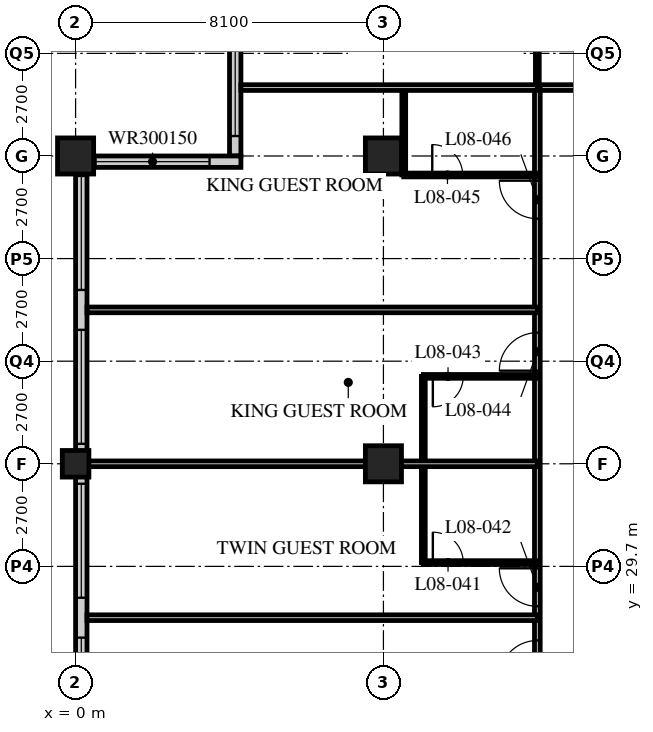
"""IFC4 building model, lengths in metres.
Left out: names, types, materials, properties, quantities, classifications, styles, units other than length and angle.
Written with IfcOpenShell. Run it as: python <this file> out.ifc"""

import sys

from ifc_helpers import new_model, si_unit, direction, frame, frame_2d, origin, origin_2d, place, context, subcontext, project, spatial, rectangle, hollow_rectangle, extrude, element, fill, save


model = new_model("IFC4")
c1 = context("Model", 3, precision=1e-05, world=origin(), true_north=direction((0.0, 1.0)))
c2 = subcontext(c1, "Body", "Model", "MODEL_VIEW")
j1 = project(units=[si_unit("LENGTHUNIT", "METRE"), si_unit("PLANEANGLEUNIT", "RADIAN")], contexts=[c1])
p1 = place(None, origin())
s1 = spatial("IfcSite", under=j1, at=p1, CompositionType="ELEMENT")
p2 = place(p1, origin())
s2 = spatial("IfcBuilding", under=s1, at=p2, CompositionType="ELEMENT")
p3 = place(p2, frame((0.0, 0.0, 39.8)))
s3 = spatial("IfcBuildingStorey", under=s2, at=p3, CompositionType="ELEMENT", Elevation=39.8)
p4 = place(p3, frame((0.0, 32.4, 0.0), z_axis=(0.0, 0.0, 1.0), x_axis=(1.0, 0.0, 0.0)))
e1 = element("IfcColumn", 1, at=p4, inside=s3, PredefinedType="COLUMN", context=c2, shape_type="SweptSolid", body=[
    extrude(hollow_rectangle(XDim=0.7, YDim=0.7, WallThickness=0.06, at=origin_2d()), origin(), (0.0, 0.0, 1.0), 3.4),
])
for number, where, z_axis, x_axis in (
    (2, (0.0, 40.5, 0.0), (0.0, 0.0, 1.0), (1.0, 0.0, 0.0)),
    (3, (8.1, 32.4, 0.0), (0.0, 0.0, 1.0), (1.0, 0.0, 0.0)),
    (4, (8.1, 40.5, 0.0), (0.0, 0.0, 1.0), (1.0, 0.0, 0.0)),
):
    element("IfcColumn", number, at=place(p3, frame(where, z_axis=z_axis, x_axis=x_axis)), inside=s3, PredefinedType="COLUMN", context=c2, shape_type="SweptSolid", body=[
        extrude(hollow_rectangle(XDim=0.95, YDim=0.95, WallThickness=0.095, at=origin_2d()), origin(), (0.0, 0.0, 1.0), 3.4),
    ])
p5 = place(p3, frame((4.2, 44.25, 0.0), z_axis=(0.0, 0.0, 1.0), x_axis=(0.0, -1.0, 0.0)))
e5 = element("IfcWall", 5, at=p5, inside=s3, PredefinedType="SOLIDWALL", context=c2, shape_type="SweptSolid", body=[
    extrude(rectangle(XDim=3.75, YDim=0.3, at=frame_2d((1.875, 0.0))), origin(), (0.0, 0.0, 1.0), 3.19),
])
p6 = place(p5, frame((0.225, 0.0, 0.9)))
e6 = element("IfcOpeningElement", 6, at=p6, cuts=e5, PredefinedType="OPENING", context=c2, shape_type="SweptSolid", body=[
    extrude(rectangle(XDim=3.0, YDim=1.5, at=frame_2d((1.5, 0.75))), frame((0.0, 0.16, 0.0), z_axis=(0.0, -1.0, 0.0), x_axis=(1.0, 0.0, 0.0)), (0.0, 0.0, 1.0), 0.32),
])
p7 = place(p3, frame((4.35, 40.35, 0.0), z_axis=(0.0, 0.0, 1.0), x_axis=(-1.0, 0.0, 0.0)))
e7 = element("IfcWall", 7, at=p7, inside=s3, PredefinedType="SOLIDWALL", context=c2, shape_type="SweptSolid", body=[
    extrude(rectangle(XDim=4.35, YDim=0.3, at=frame_2d((2.175, 0.0))), origin(), (0.0, 0.0, 1.0), 3.19),
])
p8 = place(p7, frame((0.825, 0.0, 0.9)))
e8 = element("IfcOpeningElement", 8, at=p8, cuts=e7, PredefinedType="OPENING", context=c2, shape_type="SweptSolid", body=[
    extrude(rectangle(XDim=3.0, YDim=1.5, at=frame_2d((1.5, 0.75))), frame((0.0, 0.16, 0.0), z_axis=(0.0, -1.0, 0.0), x_axis=(1.0, 0.0, 0.0)), (0.0, 0.0, 1.0), 0.32),
])
p9 = place(p3, frame((0.15, 40.2, 0.0), z_axis=(0.0, 0.0, 1.0), x_axis=(0.0, -1.0, 0.0)))
e9 = element("IfcWall", 9, at=p9, inside=s3, PredefinedType="SOLIDWALL", context=c2, shape_type="SweptSolid", body=[
    extrude(rectangle(XDim=32.1, YDim=0.3, at=frame_2d((16.05, 0.0))), origin(), (0.0, 0.0, 1.0), 3.19),
])
p10 = place(p9, frame((0.225, 0.0, 0.9)))
e10 = element("IfcOpeningElement", 10, at=p10, cuts=e9, PredefinedType="OPENING", context=c2, shape_type="SweptSolid", body=[
    extrude(rectangle(XDim=3.0, YDim=2.0, at=frame_2d((1.5, 1.0))), frame((0.0, 0.16, 0.0), z_axis=(0.0, -1.0, 0.0), x_axis=(1.0, 0.0, 0.0)), (0.0, 0.0, 1.0), 0.32),
])
p11 = place(p9, frame((4.275, 0.0, 0.9)))
e11 = element("IfcOpeningElement", 11, at=p11, cuts=e9, PredefinedType="OPENING", context=c2, shape_type="SweptSolid", body=[
    extrude(rectangle(XDim=3.0, YDim=2.0, at=frame_2d((1.5, 1.0))), frame((0.0, 0.16, 0.0), z_axis=(0.0, -1.0, 0.0), x_axis=(1.0, 0.0, 0.0)), (0.0, 0.0, 1.0), 0.32),
])
p12 = place(p9, frame((8.325, 0.0, 0.9)))
e12 = element("IfcOpeningElement", 12, at=p12, cuts=e9, PredefinedType="OPENING", context=c2, shape_type="SweptSolid", body=[
    extrude(rectangle(XDim=3.0, YDim=2.0, at=frame_2d((1.5, 1.0))), frame((0.0, 0.16, 0.0), z_axis=(0.0, -1.0, 0.0), x_axis=(1.0, 0.0, 0.0)), (0.0, 0.0, 1.0), 0.32),
])
p13 = place(p9, frame((12.375, 0.0, 0.9)))
e13 = element("IfcOpeningElement", 13, at=p13, cuts=e9, PredefinedType="OPENING", context=c2, shape_type="SweptSolid", body=[
    extrude(rectangle(XDim=3.0, YDim=2.0, at=frame_2d((1.5, 1.0))), frame((0.0, 0.16, 0.0), z_axis=(0.0, -1.0, 0.0), x_axis=(1.0, 0.0, 0.0)), (0.0, 0.0, 1.0), 0.32),
])
p14 = place(p9, frame((16.425, 0.0, 0.9)))
e14 = element("IfcOpeningElement", 14, at=p14, cuts=e9, PredefinedType="OPENING", context=c2, shape_type="SweptSolid", body=[
    extrude(rectangle(XDim=3.0, YDim=2.0, at=frame_2d((1.5, 1.0))), frame((0.0, 0.16, 0.0), z_axis=(0.0, -1.0, 0.0), x_axis=(1.0, 0.0, 0.0)), (0.0, 0.0, 1.0), 0.32),
])
p15 = place(p9, frame((20.475, 0.0, 0.9)))
e15 = element("IfcOpeningElement", 15, at=p15, cuts=e9, PredefinedType="OPENING", context=c2, shape_type="SweptSolid", body=[
    extrude(rectangle(XDim=3.0, YDim=2.0, at=frame_2d((1.5, 1.0))), frame((0.0, 0.16, 0.0), z_axis=(0.0, -1.0, 0.0), x_axis=(1.0, 0.0, 0.0)), (0.0, 0.0, 1.0), 0.32),
])
p16 = place(p9, frame((24.525, 0.0, 0.9)))
e16 = element("IfcOpeningElement", 16, at=p16, cuts=e9, PredefinedType="OPENING", context=c2, shape_type="SweptSolid", body=[
    extrude(rectangle(XDim=3.0, YDim=2.0, at=frame_2d((1.5, 1.0))), frame((0.0, 0.16, 0.0), z_axis=(0.0, -1.0, 0.0), x_axis=(1.0, 0.0, 0.0)), (0.0, 0.0, 1.0), 0.32),
])
p17 = place(p9, frame((28.575, 0.0, 0.9)))
e17 = element("IfcOpeningElement", 17, at=p17, cuts=e9, PredefinedType="OPENING", context=c2, shape_type="SweptSolid", body=[
    extrude(rectangle(XDim=3.0, YDim=2.0, at=frame_2d((1.5, 1.0))), frame((0.0, 0.16, 0.0), z_axis=(0.0, -1.0, 0.0), x_axis=(1.0, 0.0, 0.0)), (0.0, 0.0, 1.0), 0.32),
])
p18 = place(p3, frame((12.15, 42.3, 0.0), z_axis=(0.0, 0.0, 1.0), x_axis=(1.0, 0.0, 0.0)))
e18 = element("IfcWall", 18, at=p18, inside=s3, PredefinedType="PARTITIONING", context=c2, shape_type="SweptSolid", body=[
    extrude(rectangle(XDim=32.4, YDim=0.15, at=frame_2d((16.2, 0.0))), origin(), (0.0, 0.0, 1.0), 3.19),
])
p19 = place(p18, frame((6.5, 0.0, 0.0)))
e19 = element("IfcOpeningElement", 19, at=p19, cuts=e18, PredefinedType="OPENING", context=c2, shape_type="SweptSolid", body=[
    extrude(rectangle(XDim=1.0, YDim=2.1, at=frame_2d((0.5, 1.05))), frame((0.0, 0.085, 0.0), z_axis=(0.0, -1.0, 0.0), x_axis=(1.0, 0.0, 0.0)), (0.0, 0.0, 1.0), 0.17),
])
p20 = place(p18, frame((8.4, 0.0, 0.0)))
e20 = element("IfcOpeningElement", 20, at=p20, cuts=e18, PredefinedType="OPENING", context=c2, shape_type="SweptSolid", body=[
    extrude(rectangle(XDim=1.0, YDim=2.1, at=frame_2d((0.5, 1.05))), frame((0.0, 0.085, 0.0), z_axis=(0.0, -1.0, 0.0), x_axis=(1.0, 0.0, 0.0)), (0.0, 0.0, 1.0), 0.17),
])
p21 = place(p18, frame((14.6, 0.0, 0.0)))
e21 = element("IfcOpeningElement", 21, at=p21, cuts=e18, PredefinedType="OPENING", context=c2, shape_type="SweptSolid", body=[
    extrude(rectangle(XDim=1.0, YDim=2.1, at=frame_2d((0.5, 1.05))), frame((0.0, 0.085, 0.0), z_axis=(0.0, -1.0, 0.0), x_axis=(1.0, 0.0, 0.0)), (0.0, 0.0, 1.0), 0.17),
])
p22 = place(p18, frame((18.65, 0.0, 0.0)))
e22 = element("IfcOpeningElement", 22, at=p22, cuts=e18, PredefinedType="OPENING", context=c2, shape_type="SweptSolid", body=[
    extrude(rectangle(XDim=1.0, YDim=2.1, at=frame_2d((0.5, 1.05))), frame((0.0, 0.085, 0.0), z_axis=(0.0, -1.0, 0.0), x_axis=(1.0, 0.0, 0.0)), (0.0, 0.0, 1.0), 0.17),
])
p23 = place(p18, frame((23.0, 0.0, 0.0)))
e23 = element("IfcOpeningElement", 23, at=p23, cuts=e18, PredefinedType="OPENING", context=c2, shape_type="SweptSolid", body=[
    extrude(rectangle(XDim=1.0, YDim=2.1, at=frame_2d((0.5, 1.05))), frame((0.0, 0.085, 0.0), z_axis=(0.0, -1.0, 0.0), x_axis=(1.0, 0.0, 0.0)), (0.0, 0.0, 1.0), 0.17),
])
p24 = place(p18, frame((26.75, 0.0, 0.0)))
e24 = element("IfcOpeningElement", 24, at=p24, cuts=e18, PredefinedType="OPENING", context=c2, shape_type="SweptSolid", body=[
    extrude(rectangle(XDim=1.0, YDim=2.1, at=frame_2d((0.5, 1.05))), frame((0.0, 0.085, 0.0), z_axis=(0.0, -1.0, 0.0), x_axis=(1.0, 0.0, 0.0)), (0.0, 0.0, 1.0), 0.17),
])
p25 = place(p18, frame((28.775, 0.0, 0.0)))
e25 = element("IfcOpeningElement", 25, at=p25, cuts=e18, PredefinedType="OPENING", context=c2, shape_type="SweptSolid", body=[
    extrude(rectangle(XDim=1.0, YDim=2.1, at=frame_2d((0.5, 1.05))), frame((0.0, 0.085, 0.0), z_axis=(0.0, -1.0, 0.0), x_axis=(1.0, 0.0, 0.0)), (0.0, 0.0, 1.0), 0.17),
])
p26 = place(p18, frame((2.625, 0.0, 0.0)))
e26 = element("IfcOpeningElement", 26, at=p26, cuts=e18, PredefinedType="OPENING", context=c2, shape_type="SweptSolid", body=[
    extrude(rectangle(XDim=1.0, YDim=2.1, at=frame_2d((0.5, 1.05))), frame((0.0, 0.085, 0.0), z_axis=(0.0, -1.0, 0.0), x_axis=(1.0, 0.0, 0.0)), (0.0, 0.0, 1.0), 0.17),
])
p27 = place(p3, frame((12.15, 16.2, 0.0), z_axis=(0.0, 0.0, 1.0), x_axis=(0.0, 1.0, 0.0)))
e27 = element("IfcWall", 27, at=p27, inside=s3, PredefinedType="PARTITIONING", context=c2, shape_type="SweptSolid", body=[
    extrude(rectangle(XDim=26.1, YDim=0.15, at=frame_2d((13.05, 0.0))), origin(), (0.0, 0.0, 1.0), 3.19),
])
p28 = place(p27, frame((2.75, 0.0, 0.0)))
e28 = element("IfcOpeningElement", 28, at=p28, cuts=e27, PredefinedType="OPENING", context=c2, shape_type="SweptSolid", body=[
    extrude(rectangle(XDim=1.0, YDim=2.1, at=frame_2d((0.5, 1.05))), frame((0.0, 0.085, 0.0), z_axis=(0.0, -1.0, 0.0), x_axis=(1.0, 0.0, 0.0)), (0.0, 0.0, 1.0), 0.17),
])
p29 = place(p27, frame((4.35, 0.0, 0.0)))
e29 = element("IfcOpeningElement", 29, at=p29, cuts=e27, PredefinedType="OPENING", context=c2, shape_type="SweptSolid", body=[
    extrude(rectangle(XDim=1.0, YDim=2.1, at=frame_2d((0.5, 1.05))), frame((0.0, 0.085, 0.0), z_axis=(0.0, -1.0, 0.0), x_axis=(1.0, 0.0, 0.0)), (0.0, 0.0, 1.0), 0.17),
])
p30 = place(p27, frame((10.55, 0.0, 0.0)))
e30 = element("IfcOpeningElement", 30, at=p30, cuts=e27, PredefinedType="OPENING", context=c2, shape_type="SweptSolid", body=[
    extrude(rectangle(XDim=1.0, YDim=2.1, at=frame_2d((0.5, 1.05))), frame((0.0, 0.085, 0.0), z_axis=(0.0, -1.0, 0.0), x_axis=(1.0, 0.0, 0.0)), (0.0, 0.0, 1.0), 0.17),
])
p31 = place(p27, frame((12.45, 0.0, 0.0)))
e31 = element("IfcOpeningElement", 31, at=p31, cuts=e27, PredefinedType="OPENING", context=c2, shape_type="SweptSolid", body=[
    extrude(rectangle(XDim=1.0, YDim=2.1, at=frame_2d((0.5, 1.05))), frame((0.0, 0.085, 0.0), z_axis=(0.0, -1.0, 0.0), x_axis=(1.0, 0.0, 0.0)), (0.0, 0.0, 1.0), 0.17),
])
p32 = place(p27, frame((18.65, 0.0, 0.0)))
e32 = element("IfcOpeningElement", 32, at=p32, cuts=e27, PredefinedType="OPENING", context=c2, shape_type="SweptSolid", body=[
    extrude(rectangle(XDim=1.0, YDim=2.1, at=frame_2d((0.5, 1.05))), frame((0.0, 0.085, 0.0), z_axis=(0.0, -1.0, 0.0), x_axis=(1.0, 0.0, 0.0)), (0.0, 0.0, 1.0), 0.17),
])
p33 = place(p27, frame((22.65, 0.0, 0.0)))
e33 = element("IfcOpeningElement", 33, at=p33, cuts=e27, PredefinedType="OPENING", context=c2, shape_type="SweptSolid", body=[
    extrude(rectangle(XDim=1.0, YDim=2.1, at=frame_2d((0.5, 1.05))), frame((0.0, 0.085, 0.0), z_axis=(0.0, -1.0, 0.0), x_axis=(1.0, 0.0, 0.0)), (0.0, 0.0, 1.0), 0.17),
])
p34 = place(p3, frame((12.15, 28.35, 0.0), z_axis=(0.0, 0.0, 1.0), x_axis=(-1.0, 0.0, 0.0)))
e34 = element("IfcWall", 34, at=p34, inside=s3, PredefinedType="PARTITIONING", context=c2, shape_type="SweptSolid", body=[
    extrude(rectangle(XDim=11.85, YDim=0.15, at=frame_2d((5.925, 0.0))), origin(), (0.0, 0.0, 1.0), 3.19),
])
p35 = place(p3, frame((9.15, 29.8, 0.0), z_axis=(0.0, 0.0, 1.0), x_axis=(0.0, 1.0, 0.0)))
e35 = element("IfcWall", 35, at=p35, inside=s3, PredefinedType="PARTITIONING", context=c2, shape_type="SweptSolid", body=[
    extrude(rectangle(XDim=4.9, YDim=0.1, at=frame_2d((2.45, 0.0))), origin(), (0.0, 0.0, 1.0), 3.19),
])
p36 = place(p3, frame((12.15, 29.8, 0.0), z_axis=(0.0, 0.0, 1.0), x_axis=(-1.0, 0.0, 0.0)))
e36 = element("IfcWall", 36, at=p36, inside=s3, PredefinedType="PARTITIONING", context=c2, shape_type="SweptSolid", body=[
    extrude(rectangle(XDim=3.0, YDim=0.1, at=frame_2d((1.5, 0.0))), origin(), (0.0, 0.0, 1.0), 3.19),
])
p37 = place(p36, frame((1.95, 0.0, 0.0)))
e37 = element("IfcOpeningElement", 37, at=p37, cuts=e36, PredefinedType="OPENING", context=c2, shape_type="SweptSolid", body=[
    extrude(rectangle(XDim=0.8, YDim=2.1, at=frame_2d((0.4, 1.05))), frame((0.0, 0.06, 0.0), z_axis=(0.0, -1.0, 0.0), x_axis=(1.0, 0.0, 0.0)), (0.0, 0.0, 1.0), 0.12),
])
p38 = place(p3, frame((12.15, 32.4, 0.0), z_axis=(0.0, 0.0, 1.0), x_axis=(-1.0, 0.0, 0.0)))
e38 = element("IfcWall", 38, at=p38, inside=s3, PredefinedType="PARTITIONING", context=c2, shape_type="SweptSolid", body=[
    extrude(rectangle(XDim=11.85, YDim=0.15, at=frame_2d((5.925, 0.0))), origin(), (0.0, 0.0, 1.0), 2.578),
])
p39 = place(p3, frame((12.15, 34.7, 0.0), z_axis=(0.0, 0.0, 1.0), x_axis=(-1.0, 0.0, 0.0)))
e39 = element("IfcWall", 39, at=p39, inside=s3, PredefinedType="PARTITIONING", context=c2, shape_type="SweptSolid", body=[
    extrude(rectangle(XDim=3.0, YDim=0.1, at=frame_2d((1.5, 0.0))), origin(), (0.0, 0.0, 1.0), 3.19),
])
p40 = place(p39, frame((1.95, 0.0, 0.0)))
e40 = element("IfcOpeningElement", 40, at=p40, cuts=e39, PredefinedType="OPENING", context=c2, shape_type="SweptSolid", body=[
    extrude(rectangle(XDim=0.8, YDim=2.1, at=frame_2d((0.4, 1.05))), frame((0.0, 0.06, 0.0), z_axis=(0.0, -1.0, 0.0), x_axis=(1.0, 0.0, 0.0)), (0.0, 0.0, 1.0), 0.12),
])
p41 = place(p3, frame((12.15, 36.45, 0.0), z_axis=(0.0, 0.0, 1.0), x_axis=(-1.0, 0.0, 0.0)))
e41 = element("IfcWall", 41, at=p41, inside=s3, PredefinedType="PARTITIONING", context=c2, shape_type="SweptSolid", body=[
    extrude(rectangle(XDim=11.85, YDim=0.15, at=frame_2d((5.925, 0.0))), origin(), (0.0, 0.0, 1.0), 3.19),
])
p42 = place(p3, frame((8.635, 40.0, 0.0), z_axis=(0.0, 0.0, 1.0), x_axis=(0.0, 1.0, 0.0)))
e42 = element("IfcWall", 42, at=p42, inside=s3, PredefinedType="PARTITIONING", context=c2, shape_type="SweptSolid", body=[
    extrude(rectangle(XDim=2.3, YDim=0.1, at=frame_2d((1.15, 0.0))), origin(), (0.0, 0.0, 1.0), 3.19),
])
p43 = place(p3, frame((12.15, 40.0, 0.0), z_axis=(0.0, 0.0, 1.0), x_axis=(-1.0, 0.0, 0.0)))
e43 = element("IfcWall", 43, at=p43, inside=s3, PredefinedType="PARTITIONING", context=c2, shape_type="SweptSolid", body=[
    extrude(rectangle(XDim=3.515, YDim=0.1, at=frame_2d((1.757, 0.0))), origin(), (0.0, 0.0, 1.0), 3.19),
])
p44 = place(p43, frame((1.965, 0.0, 0.0)))
e44 = element("IfcOpeningElement", 44, at=p44, cuts=e43, PredefinedType="OPENING", context=c2, shape_type="SweptSolid", body=[
    extrude(rectangle(XDim=0.8, YDim=2.1, at=frame_2d((0.4, 1.05))), frame((0.0, 0.06, 0.0), z_axis=(0.0, -1.0, 0.0), x_axis=(1.0, 0.0, 0.0)), (0.0, 0.0, 1.0), 0.12),
])
p45 = place(p3, frame((12.15, 42.3, 0.0), z_axis=(0.0, 0.0, 1.0), x_axis=(0.0, 1.0, 0.0)))
e45 = element("IfcWall", 45, at=p45, inside=s3, PredefinedType="PARTITIONING", context=c2, shape_type="SweptSolid", body=[
    extrude(rectangle(XDim=2.4, YDim=0.1, at=frame_2d((1.2, 0.0))), origin(), (0.0, 0.0, 1.0), 3.19),
])
p46 = place(p3, frame((4.35, 42.3, 0.0), z_axis=(0.0, 0.0, 1.0), x_axis=(1.0, 0.0, 0.0)))
e46 = element("IfcWall", 46, at=p46, inside=s3, PredefinedType="PARTITIONING", context=c2, shape_type="SweptSolid", body=[
    extrude(rectangle(XDim=7.8, YDim=0.15, at=frame_2d((3.9, 0.0))), origin(), (0.0, 0.0, 1.0), 3.19),
])
p47 = place(p6, origin())
e47 = element("IfcWindow", 47, at=p47, inside=s3, PartitioningType="SINGLE_PANEL", PredefinedType="WINDOW", context=c2, shape_type="SweptSolid", body=[
    extrude(rectangle(XDim=3.0, YDim=1.5, at=frame_2d((1.5, 0.75))), frame((0.0, 0.03, 0.0), z_axis=(0.0, -1.0, 0.0), x_axis=(1.0, 0.0, 0.0)), (0.0, 0.0, 1.0), 0.06),
])
fill(e6, e47)
p48 = place(p8, origin())
e48 = element("IfcWindow", 48, at=p48, inside=s3, PartitioningType="SINGLE_PANEL", PredefinedType="WINDOW", context=c2, shape_type="SweptSolid", body=[
    extrude(rectangle(XDim=3.0, YDim=1.5, at=frame_2d((1.5, 0.75))), frame((0.0, 0.03, 0.0), z_axis=(0.0, -1.0, 0.0), x_axis=(1.0, 0.0, 0.0)), (0.0, 0.0, 1.0), 0.06),
])
fill(e8, e48)
p49 = place(p10, origin())
e49 = element("IfcWindow", 49, at=p49, inside=s3, PartitioningType="SINGLE_PANEL", PredefinedType="WINDOW", context=c2, shape_type="SweptSolid", body=[
    extrude(rectangle(XDim=3.0, YDim=2.0, at=frame_2d((1.5, 1.0))), frame((0.0, 0.03, 0.0), z_axis=(0.0, -1.0, 0.0), x_axis=(1.0, 0.0, 0.0)), (0.0, 0.0, 1.0), 0.06),
])
fill(e10, e49)
p50 = place(p11, origin())
e50 = element("IfcWindow", 50, at=p50, inside=s3, PartitioningType="SINGLE_PANEL", PredefinedType="WINDOW", context=c2, shape_type="SweptSolid", body=[
    extrude(rectangle(XDim=3.0, YDim=2.0, at=frame_2d((1.5, 1.0))), frame((0.0, 0.03, 0.0), z_axis=(0.0, -1.0, 0.0), x_axis=(1.0, 0.0, 0.0)), (0.0, 0.0, 1.0), 0.06),
])
fill(e11, e50)
p51 = place(p12, origin())
e51 = element("IfcWindow", 51, at=p51, inside=s3, PartitioningType="SINGLE_PANEL", PredefinedType="WINDOW", context=c2, shape_type="SweptSolid", body=[
    extrude(rectangle(XDim=3.0, YDim=2.0, at=frame_2d((1.5, 1.0))), frame((0.0, 0.03, 0.0), z_axis=(0.0, -1.0, 0.0), x_axis=(1.0, 0.0, 0.0)), (0.0, 0.0, 1.0), 0.06),
])
fill(e12, e51)
p52 = place(p13, origin())
e52 = element("IfcWindow", 52, at=p52, inside=s3, PartitioningType="SINGLE_PANEL", PredefinedType="WINDOW", context=c2, shape_type="SweptSolid", body=[
    extrude(rectangle(XDim=3.0, YDim=2.0, at=frame_2d((1.5, 1.0))), frame((0.0, 0.03, 0.0), z_axis=(0.0, -1.0, 0.0), x_axis=(1.0, 0.0, 0.0)), (0.0, 0.0, 1.0), 0.06),
])
fill(e13, e52)
p53 = place(p30, origin())
e53 = element("IfcDoor", 53, at=p53, inside=s3, OperationType="SINGLE_SWING_LEFT", PredefinedType="DOOR", context=c2, shape_type="SweptSolid", body=[
    extrude(rectangle(XDim=1.0, YDim=2.1, at=frame_2d((0.5, 1.05))), frame((0.0, 0.025, 0.0), z_axis=(0.0, -1.0, 0.0), x_axis=(1.0, 0.0, 0.0)), (0.0, 0.0, 1.0), 0.05),
])
fill(e30, e53)
p54 = place(p37, origin())
e54 = element("IfcDoor", 54, at=p54, inside=s3, OperationType="SINGLE_SWING_LEFT", PredefinedType="DOOR", context=c2, shape_type="SweptSolid", body=[
    extrude(rectangle(XDim=0.8, YDim=2.1, at=frame_2d((0.4, 1.05))), frame((0.0, 0.025, 0.0), z_axis=(0.0, -1.0, 0.0), x_axis=(1.0, 0.0, 0.0)), (0.0, 0.0, 1.0), 0.05),
])
fill(e37, e54)
p55 = place(p31, origin())
e55 = element("IfcDoor", 55, at=p55, inside=s3, OperationType="SINGLE_SWING_RIGHT", PredefinedType="DOOR", context=c2, shape_type="SweptSolid", body=[
    extrude(rectangle(XDim=1.0, YDim=2.1, at=frame_2d((0.5, 1.05))), frame((0.0, 0.025, 0.0), z_axis=(0.0, -1.0, 0.0), x_axis=(1.0, 0.0, 0.0)), (0.0, 0.0, 1.0), 0.05),
])
fill(e31, e55)
p56 = place(p40, origin())
e56 = element("IfcDoor", 56, at=p56, inside=s3, OperationType="SINGLE_SWING_RIGHT", PredefinedType="DOOR", context=c2, shape_type="SweptSolid", body=[
    extrude(rectangle(XDim=0.8, YDim=2.1, at=frame_2d((0.4, 1.05))), frame((0.0, 0.025, 0.0), z_axis=(0.0, -1.0, 0.0), x_axis=(1.0, 0.0, 0.0)), (0.0, 0.0, 1.0), 0.05),
])
fill(e40, e56)
p57 = place(p32, origin())
e57 = element("IfcDoor", 57, at=p57, inside=s3, OperationType="SINGLE_SWING_LEFT", PredefinedType="DOOR", context=c2, shape_type="SweptSolid", body=[
    extrude(rectangle(XDim=1.0, YDim=2.1, at=frame_2d((0.5, 1.05))), frame((0.0, 0.025, 0.0), z_axis=(0.0, -1.0, 0.0), x_axis=(1.0, 0.0, 0.0)), (0.0, 0.0, 1.0), 0.05),
])
fill(e32, e57)
p58 = place(p44, origin())
e58 = element("IfcDoor", 58, at=p58, inside=s3, OperationType="SINGLE_SWING_LEFT", PredefinedType="DOOR", context=c2, shape_type="SweptSolid", body=[
    extrude(rectangle(XDim=0.8, YDim=2.1, at=frame_2d((0.4, 1.05))), frame((0.0, 0.025, 0.0), z_axis=(0.0, -1.0, 0.0), x_axis=(1.0, 0.0, 0.0)), (0.0, 0.0, 1.0), 0.05),
])
fill(e44, e58)
p59 = place(p33, origin())
e59 = element("IfcDoor", 59, at=p59, inside=s3, OperationType="SINGLE_SWING_RIGHT", PredefinedType="DOOR", context=c2, shape_type="SweptSolid", body=[
    extrude(rectangle(XDim=1.0, YDim=2.1, at=frame_2d((0.5, 1.05))), frame((0.0, 0.025, 0.0), z_axis=(0.0, -1.0, 0.0), x_axis=(1.0, 0.0, 0.0)), (0.0, 0.0, 1.0), 0.05),
])
fill(e33, e59)
save(model, sys.argv[1])
